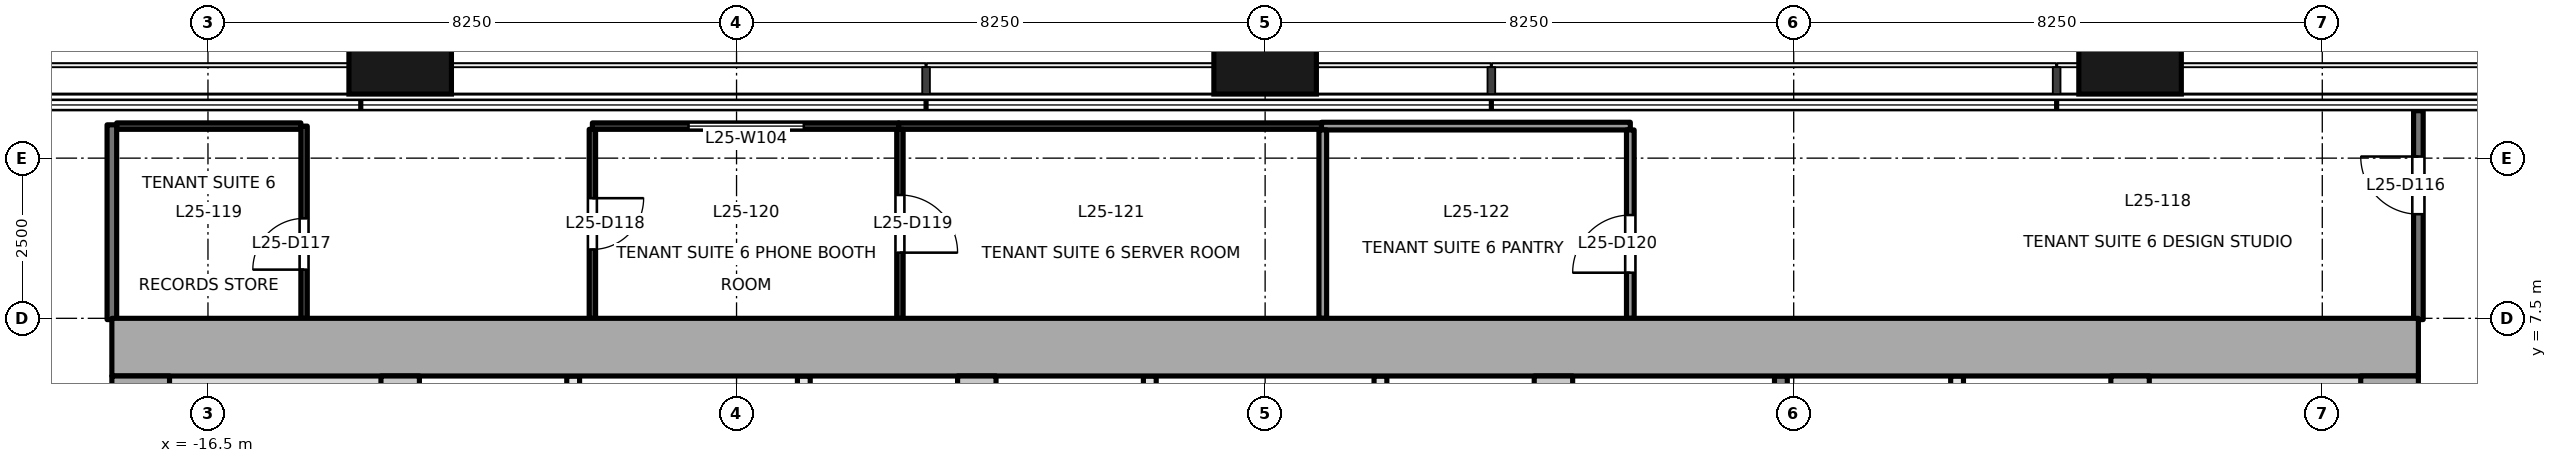
"""IFC4 building model, lengths in metres.
Left out: names, types, materials, properties, quantities, classifications, styles, units other than length and angle.
Written with IfcOpenShell. Run it as: python <this file> out.ifc"""

import sys

from ifc_helpers import new_model, si_unit, direction, frame, frame_2d, origin, origin_2d, place, context, subcontext, project, spatial, rectangle, extrude, element, fill, save


model = new_model("IFC4")
c1 = context("Model", 3, precision=1e-05, world=origin(), true_north=direction((0.0, 1.0)))
c2 = subcontext(c1, "Body", "Model", "MODEL_VIEW")
j1 = project(units=[si_unit("LENGTHUNIT", "METRE"), si_unit("PLANEANGLEUNIT", "RADIAN")], contexts=[c1])
p1 = place(None, origin())
s1 = spatial("IfcSite", under=j1, at=p1, CompositionType="ELEMENT")
p2 = place(p1, origin())
s2 = spatial("IfcBuilding", under=s1, at=p2, CompositionType="ELEMENT")
p3 = place(p2, frame((0.0, 0.0, 111.7)))
s3 = spatial("IfcBuildingStorey", under=s2, at=p3, CompositionType="ELEMENT", Elevation=111.7)
for number, where, z_axis, x_axis in (
    (1, (-13.5, 11.9, -0.2), (0.0, 0.0, 1.0), (1.0, 0.0, 0.0)),
    (2, (0.0, 11.9, -0.2), (0.0, 0.0, 1.0), (1.0, 0.0, 0.0)),
    (3, (13.5, 11.9, -0.2), (0.0, 0.0, 1.0), (1.0, 0.0, 0.0)),
):
    element("IfcColumn", number, at=place(p3, frame(where, z_axis=z_axis, x_axis=x_axis)), inside=s3, PredefinedType="COLUMN", context=c2, shape_type="SweptSolid", body=[
        extrude(rectangle(XDim=1.6, YDim=1.8, at=origin_2d()), origin(), (0.0, 0.0, 1.0), 4.0),
    ])
p4 = place(p3, frame((-18.0, 7.05, -0.2), z_axis=(0.0, 0.0, 1.0), x_axis=(1.0, 0.0, 0.0)))
e4 = element("IfcWall", 4, at=p4, inside=s3, PredefinedType="SHEAR", context=c2, shape_type="SweptSolid", body=[
    extrude(rectangle(XDim=36.0, YDim=0.9, at=frame_2d((18.0, 0.0))), origin(), (0.0, 0.0, 1.0), 4.0),
])
p5 = place(p3, frame((-17.55, -6.6, -0.2), z_axis=(0.0, 0.0, 1.0), x_axis=(0.0, 1.0, 0.0)))
e5 = element("IfcWall", 5, at=p5, inside=s3, PredefinedType="SHEAR", context=c2, shape_type="SweptSolid", body=[
    extrude(rectangle(XDim=13.2, YDim=0.9, at=frame_2d((6.6, 0.0))), origin(), (0.0, 0.0, 1.0), 4.0),
])
p6 = place(p5, frame((4.55, 0.0, 0.2)))
e6 = element("IfcOpeningElement", 6, at=p6, cuts=e5, PredefinedType="OPENING", context=c2, shape_type="SweptSolid", body=[
    extrude(rectangle(XDim=1.2, YDim=2.1, at=frame_2d((0.6, 1.05))), frame((0.0, 0.46, 0.0), z_axis=(0.0, -1.0, 0.0), x_axis=(1.0, 0.0, 0.0)), (0.0, 0.0, 1.0), 0.921),
])
p7 = place(p3, frame((17.55, -6.6, -0.2), z_axis=(0.0, 0.0, 1.0), x_axis=(0.0, 1.0, 0.0)))
e7 = element("IfcWall", 7, at=p7, inside=s3, PredefinedType="SHEAR", context=c2, shape_type="SweptSolid", body=[
    extrude(rectangle(XDim=13.2, YDim=0.9, at=frame_2d((6.6, 0.0))), origin(), (0.0, 0.0, 1.0), 4.0),
])
p8 = place(p7, frame((4.55, 0.0, 0.2)))
e8 = element("IfcOpeningElement", 8, at=p8, cuts=e7, PredefinedType="OPENING", context=c2, shape_type="SweptSolid", body=[
    extrude(rectangle(XDim=1.2, YDim=2.1, at=frame_2d((0.6, 1.05))), frame((0.0, 0.46, 0.0), z_axis=(0.0, -1.0, 0.0), x_axis=(1.0, 0.0, 0.0)), (0.0, 0.0, 1.0), 0.921),
])
for number, where, z_axis, x_axis in (
    (9, (-13.5, -6.6, -0.2), (0.0, 0.0, 1.0), (0.0, 1.0, 0.0)),
    (10, (-4.5, -6.6, -0.2), (0.0, 0.0, 1.0), (0.0, 1.0, 0.0)),
    (11, (4.5, -6.6, -0.2), (0.0, 0.0, 1.0), (0.0, 1.0, 0.0)),
    (12, (13.5, -6.6, -0.2), (0.0, 0.0, 1.0), (0.0, 1.0, 0.0)),
):
    element("IfcWall", number, at=place(p3, frame(where, z_axis=z_axis, x_axis=x_axis)), inside=s3, PredefinedType="SHEAR", context=c2, shape_type="SweptSolid", body=[
        extrude(rectangle(XDim=13.2, YDim=0.6, at=frame_2d((6.6, 0.0))), origin(), (0.0, 0.0, 1.0), 4.0),
    ])
p9 = place(p3, frame((-10.8, -6.6, 0.0), z_axis=(0.0, 0.0, 1.0), x_axis=(0.0, 1.0, 0.0)))
e13 = element("IfcWall", 13, at=p9, inside=s3, PredefinedType="PARTITIONING", context=c2, shape_type="SweptSolid", body=[
    extrude(rectangle(XDim=13.2, YDim=0.2, at=frame_2d((6.6, 0.0))), origin(), (0.0, 0.0, 1.0), 3.8),
])
p10 = place(p9, frame((0.55, 0.0, 0.0)))
e14 = element("IfcOpeningElement", 14, at=p10, cuts=e13, PredefinedType="OPENING", context=c2, shape_type="SweptSolid", body=[
    extrude(rectangle(XDim=0.9, YDim=2.1, at=frame_2d((0.45, 1.05))), frame((0.0, 0.111, 0.0), z_axis=(0.0, -1.0, 0.0), x_axis=(1.0, 0.0, 0.0)), (0.0, 0.0, 1.0), 0.221),
])
p11 = place(p9, frame((2.9, 0.0, 0.0)))
e15 = element("IfcOpeningElement", 15, at=p11, cuts=e13, PredefinedType="OPENING", context=c2, shape_type="SweptSolid", body=[
    extrude(rectangle(XDim=1.2, YDim=2.1, at=frame_2d((0.6, 1.05))), frame((0.0, 0.111, 0.0), z_axis=(0.0, -1.0, 0.0), x_axis=(1.0, 0.0, 0.0)), (0.0, 0.0, 1.0), 0.221),
])
p12 = place(p9, frame((5.7, 0.0, 0.0)))
e16 = element("IfcOpeningElement", 16, at=p12, cuts=e13, PredefinedType="OPENING", context=c2, shape_type="SweptSolid", body=[
    extrude(rectangle(XDim=1.2, YDim=2.1, at=frame_2d((0.6, 1.05))), frame((0.0, 0.111, 0.0), z_axis=(0.0, -1.0, 0.0), x_axis=(1.0, 0.0, 0.0)), (0.0, 0.0, 1.0), 0.221),
])
p13 = place(p9, frame((8.5, 0.0, 0.0)))
e17 = element("IfcOpeningElement", 17, at=p13, cuts=e13, PredefinedType="OPENING", context=c2, shape_type="SweptSolid", body=[
    extrude(rectangle(XDim=1.2, YDim=2.1, at=frame_2d((0.6, 1.05))), frame((0.0, 0.111, 0.0), z_axis=(0.0, -1.0, 0.0), x_axis=(1.0, 0.0, 0.0)), (0.0, 0.0, 1.0), 0.221),
])
p14 = place(p9, frame((11.3, 0.0, 0.0)))
e18 = element("IfcOpeningElement", 18, at=p14, cuts=e13, PredefinedType="OPENING", context=c2, shape_type="SweptSolid", body=[
    extrude(rectangle(XDim=1.2, YDim=2.1, at=frame_2d((0.6, 1.05))), frame((0.0, 0.111, 0.0), z_axis=(0.0, -1.0, 0.0), x_axis=(1.0, 0.0, 0.0)), (0.0, 0.0, 1.0), 0.221),
])
p15 = place(p3, frame((-7.2, -6.6, 0.0), z_axis=(0.0, 0.0, 1.0), x_axis=(0.0, 1.0, 0.0)))
e19 = element("IfcWall", 19, at=p15, inside=s3, PredefinedType="PARTITIONING", context=c2, shape_type="SweptSolid", body=[
    extrude(rectangle(XDim=13.2, YDim=0.2, at=frame_2d((6.6, 0.0))), origin(), (0.0, 0.0, 1.0), 3.8),
])
p16 = place(p15, frame((0.55, 0.0, 0.0)))
e20 = element("IfcOpeningElement", 20, at=p16, cuts=e19, PredefinedType="OPENING", context=c2, shape_type="SweptSolid", body=[
    extrude(rectangle(XDim=0.9, YDim=2.1, at=frame_2d((0.45, 1.05))), frame((0.0, 0.111, 0.0), z_axis=(0.0, -1.0, 0.0), x_axis=(1.0, 0.0, 0.0)), (0.0, 0.0, 1.0), 0.221),
])
p17 = place(p15, frame((2.9, 0.0, 0.0)))
e21 = element("IfcOpeningElement", 21, at=p17, cuts=e19, PredefinedType="OPENING", context=c2, shape_type="SweptSolid", body=[
    extrude(rectangle(XDim=1.2, YDim=2.1, at=frame_2d((0.6, 1.05))), frame((0.0, 0.111, 0.0), z_axis=(0.0, -1.0, 0.0), x_axis=(1.0, 0.0, 0.0)), (0.0, 0.0, 1.0), 0.221),
])
p18 = place(p15, frame((5.7, 0.0, 0.0)))
e22 = element("IfcOpeningElement", 22, at=p18, cuts=e19, PredefinedType="OPENING", context=c2, shape_type="SweptSolid", body=[
    extrude(rectangle(XDim=1.2, YDim=2.1, at=frame_2d((0.6, 1.05))), frame((0.0, 0.111, 0.0), z_axis=(0.0, -1.0, 0.0), x_axis=(1.0, 0.0, 0.0)), (0.0, 0.0, 1.0), 0.221),
])
p19 = place(p15, frame((8.5, 0.0, 0.0)))
e23 = element("IfcOpeningElement", 23, at=p19, cuts=e19, PredefinedType="OPENING", context=c2, shape_type="SweptSolid", body=[
    extrude(rectangle(XDim=1.2, YDim=2.1, at=frame_2d((0.6, 1.05))), frame((0.0, 0.111, 0.0), z_axis=(0.0, -1.0, 0.0), x_axis=(1.0, 0.0, 0.0)), (0.0, 0.0, 1.0), 0.221),
])
p20 = place(p15, frame((11.3, 0.0, 0.0)))
e24 = element("IfcOpeningElement", 24, at=p20, cuts=e19, PredefinedType="OPENING", context=c2, shape_type="SweptSolid", body=[
    extrude(rectangle(XDim=1.2, YDim=2.1, at=frame_2d((0.6, 1.05))), frame((0.0, 0.111, 0.0), z_axis=(0.0, -1.0, 0.0), x_axis=(1.0, 0.0, 0.0)), (0.0, 0.0, 1.0), 0.221),
])
p21 = place(p3, frame((-1.8, -6.6, 0.0), z_axis=(0.0, 0.0, 1.0), x_axis=(0.0, 1.0, 0.0)))
e25 = element("IfcWall", 25, at=p21, inside=s3, PredefinedType="PARTITIONING", context=c2, shape_type="SweptSolid", body=[
    extrude(rectangle(XDim=13.2, YDim=0.2, at=frame_2d((6.6, 0.0))), origin(), (0.0, 0.0, 1.0), 3.8),
])
p22 = place(p21, frame((0.55, 0.0, 0.0)))
e26 = element("IfcOpeningElement", 26, at=p22, cuts=e25, PredefinedType="OPENING", context=c2, shape_type="SweptSolid", body=[
    extrude(rectangle(XDim=0.9, YDim=2.1, at=frame_2d((0.45, 1.05))), frame((0.0, 0.111, 0.0), z_axis=(0.0, -1.0, 0.0), x_axis=(1.0, 0.0, 0.0)), (0.0, 0.0, 1.0), 0.221),
])
p23 = place(p3, frame((1.8, -6.6, 0.0), z_axis=(0.0, 0.0, 1.0), x_axis=(0.0, 1.0, 0.0)))
e27 = element("IfcWall", 27, at=p23, inside=s3, PredefinedType="PARTITIONING", context=c2, shape_type="SweptSolid", body=[
    extrude(rectangle(XDim=13.2, YDim=0.2, at=frame_2d((6.6, 0.0))), origin(), (0.0, 0.0, 1.0), 3.8),
])
p24 = place(p23, frame((0.55, 0.0, 0.0)))
e28 = element("IfcOpeningElement", 28, at=p24, cuts=e27, PredefinedType="OPENING", context=c2, shape_type="SweptSolid", body=[
    extrude(rectangle(XDim=0.9, YDim=2.1, at=frame_2d((0.45, 1.05))), frame((0.0, 0.111, 0.0), z_axis=(0.0, -1.0, 0.0), x_axis=(1.0, 0.0, 0.0)), (0.0, 0.0, 1.0), 0.221),
])
p25 = place(p3, frame((8.05, -6.6, 0.0), z_axis=(0.0, 0.0, 1.0), x_axis=(0.0, 1.0, 0.0)))
e29 = element("IfcWall", 29, at=p25, inside=s3, PredefinedType="PARTITIONING", context=c2, shape_type="SweptSolid", body=[
    extrude(rectangle(XDim=13.2, YDim=0.2, at=frame_2d((6.6, 0.0))), origin(), (0.0, 0.0, 1.0), 3.8),
])
p26 = place(p25, frame((0.91, 0.0, 0.0)))
e30 = element("IfcOpeningElement", 30, at=p26, cuts=e29, PredefinedType="OPENING", context=c2, shape_type="SweptSolid", body=[
    extrude(rectangle(XDim=0.9, YDim=2.1, at=frame_2d((0.45, 1.05))), frame((0.0, 0.111, 0.0), z_axis=(0.0, -1.0, 0.0), x_axis=(1.0, 0.0, 0.0)), (0.0, 0.0, 1.0), 0.221),
])
p27 = place(p25, frame((3.46, 0.0, 0.0)))
e31 = element("IfcOpeningElement", 31, at=p27, cuts=e29, PredefinedType="OPENING", context=c2, shape_type="SweptSolid", body=[
    extrude(rectangle(XDim=0.9, YDim=2.1, at=frame_2d((0.45, 1.05))), frame((0.0, 0.111, 0.0), z_axis=(0.0, -1.0, 0.0), x_axis=(1.0, 0.0, 0.0)), (0.0, 0.0, 1.0), 0.221),
])
p28 = place(p25, frame((5.5, 0.0, 0.0)))
e32 = element("IfcOpeningElement", 32, at=p28, cuts=e29, PredefinedType="OPENING", context=c2, shape_type="SweptSolid", body=[
    extrude(rectangle(XDim=0.9, YDim=2.1, at=frame_2d((0.45, 1.05))), frame((0.0, 0.111, 0.0), z_axis=(0.0, -1.0, 0.0), x_axis=(1.0, 0.0, 0.0)), (0.0, 0.0, 1.0), 0.221),
])
p29 = place(p25, frame((11.9, 0.0, 0.0)))
e33 = element("IfcOpeningElement", 33, at=p29, cuts=e29, PredefinedType="OPENING", context=c2, shape_type="SweptSolid", body=[
    extrude(rectangle(XDim=1.1, YDim=2.1, at=frame_2d((0.55, 1.05))), frame((0.0, 0.111, 0.0), z_axis=(0.0, -1.0, 0.0), x_axis=(1.0, 0.0, 0.0)), (0.0, 0.0, 1.0), 0.221),
])
p30 = place(p3, frame((10.8, -6.6, 0.0), z_axis=(0.0, 0.0, 1.0), x_axis=(0.0, 1.0, 0.0)))
e34 = element("IfcWall", 34, at=p30, inside=s3, PredefinedType="PARTITIONING", context=c2, shape_type="SweptSolid", body=[
    extrude(rectangle(XDim=13.2, YDim=0.2, at=frame_2d((6.6, 0.0))), origin(), (0.0, 0.0, 1.0), 3.8),
])
p31 = place(p30, frame((0.7, 0.0, 0.0)))
e35 = element("IfcOpeningElement", 35, at=p31, cuts=e34, PredefinedType="OPENING", context=c2, shape_type="SweptSolid", body=[
    extrude(rectangle(XDim=1.2, YDim=2.1, at=frame_2d((0.6, 1.05))), frame((0.0, 0.111, 0.0), z_axis=(0.0, -1.0, 0.0), x_axis=(1.0, 0.0, 0.0)), (0.0, 0.0, 1.0), 0.221),
])
p32 = place(p30, frame((9.15, 0.0, 0.0)))
e36 = element("IfcOpeningElement", 36, at=p32, cuts=e34, PredefinedType="OPENING", context=c2, shape_type="SweptSolid", body=[
    extrude(rectangle(XDim=0.9, YDim=2.1, at=frame_2d((0.45, 1.05))), frame((0.0, 0.111, 0.0), z_axis=(0.0, -1.0, 0.0), x_axis=(1.0, 0.0, 0.0)), (0.0, 0.0, 1.0), 0.221),
])
p33 = place(p30, frame((11.55, 0.0, 0.0)))
e37 = element("IfcOpeningElement", 37, at=p33, cuts=e34, PredefinedType="OPENING", context=c2, shape_type="SweptSolid", body=[
    extrude(rectangle(XDim=0.9, YDim=2.1, at=frame_2d((0.45, 1.05))), frame((0.0, 0.111, 0.0), z_axis=(0.0, -1.0, 0.0), x_axis=(1.0, 0.0, 0.0)), (0.0, 0.0, 1.0), 0.221),
])
p34 = place(p3, frame((18.0, 7.48, 0.0), z_axis=(0.0, 0.0, 1.0), x_axis=(0.0, 1.0, 0.0)))
e38 = element("IfcWall", 38, at=p34, inside=s3, PredefinedType="PARTITIONING", context=c2, shape_type="SweptSolid", body=[
    extrude(rectangle(XDim=3.26, YDim=0.15, at=frame_2d((1.63, 0.0))), origin(), (0.0, 0.0, 1.0), 2.8),
])
p35 = place(p34, frame((1.645, 0.0, 0.0)))
e39 = element("IfcOpeningElement", 39, at=p35, cuts=e38, PredefinedType="OPENING", context=c2, shape_type="SweptSolid", body=[
    extrude(rectangle(XDim=0.9, YDim=2.1, at=frame_2d((0.45, 1.05))), frame((0.0, 0.085, 0.0), z_axis=(0.0, -1.0, 0.0), x_axis=(1.0, 0.0, 0.0)), (0.0, 0.0, 1.0), 0.171),
])
p36 = place(p3, frame((-18.0, 10.52, 0.0), z_axis=(0.0, 0.0, 1.0), x_axis=(0.0, -1.0, 0.0)))
e40 = element("IfcWall", 40, at=p36, inside=s3, PredefinedType="PARTITIONING", context=c2, shape_type="SweptSolid", body=[
    extrude(rectangle(XDim=3.04, YDim=0.15, at=frame_2d((1.52, 0.0))), origin(), (0.0, 0.0, 1.0), 3.8),
])
p37 = place(p3, frame((-15.05, 10.5, 0.0), z_axis=(0.0, 0.0, 1.0), x_axis=(-1.0, 0.0, 0.0)))
e41 = element("IfcWall", 41, at=p37, inside=s3, PredefinedType="PARTITIONING", context=c2, shape_type="SweptSolid", body=[
    extrude(rectangle(XDim=2.875, YDim=0.1, at=frame_2d((1.438, 0.0))), origin(), (0.0, 0.0, 1.0), 3.8),
])
p38 = place(p3, frame((-15.0, 7.5, 0.0), z_axis=(0.0, 0.0, 1.0), x_axis=(0.0, 1.0, 0.0)))
e42 = element("IfcWall", 42, at=p38, inside=s3, PredefinedType="PARTITIONING", context=c2, shape_type="SweptSolid", body=[
    extrude(rectangle(XDim=3.0, YDim=0.1, at=frame_2d((1.5, 0.0))), origin(), (0.0, 0.0, 1.0), 3.8),
])
p39 = place(p38, frame((0.76, 0.0, 0.0)))
e43 = element("IfcOpeningElement", 43, at=p39, cuts=e42, PredefinedType="OPENING", context=c2, shape_type="SweptSolid", body=[
    extrude(rectangle(XDim=0.8, YDim=2.1, at=frame_2d((0.4, 1.05))), frame((0.0, 0.061, 0.0), z_axis=(0.0, -1.0, 0.0), x_axis=(1.0, 0.0, 0.0)), (0.0, 0.0, 1.0), 0.121),
])
p40 = place(p3, frame((-10.5, 10.45, 0.0), z_axis=(0.0, 0.0, 1.0), x_axis=(0.0, -1.0, 0.0)))
e44 = element("IfcWall", 44, at=p40, inside=s3, PredefinedType="PARTITIONING", context=c2, shape_type="SweptSolid", body=[
    extrude(rectangle(XDim=2.95, YDim=0.1, at=frame_2d((1.475, 0.0))), origin(), (0.0, 0.0, 1.0), 3.8),
])
p41 = place(p40, frame((1.075, 0.0, 0.0)))
e45 = element("IfcOpeningElement", 45, at=p41, cuts=e44, PredefinedType="OPENING", context=c2, shape_type="SweptSolid", body=[
    extrude(rectangle(XDim=0.8, YDim=2.1, at=frame_2d((0.4, 1.05))), frame((0.0, 0.061, 0.0), z_axis=(0.0, -1.0, 0.0), x_axis=(1.0, 0.0, 0.0)), (0.0, 0.0, 1.0), 0.121),
])
p42 = place(p3, frame((-5.72, 10.5, 0.0), z_axis=(0.0, 0.0, 1.0), x_axis=(-1.0, 0.0, 0.0)))
e46 = element("IfcWall", 46, at=p42, inside=s3, PredefinedType="PARTITIONING", context=c2, shape_type="SweptSolid", body=[
    extrude(rectangle(XDim=4.78, YDim=0.1, at=frame_2d((2.39, 0.0))), origin(), (0.0, 0.0, 1.0), 3.5),
])
p43 = place(p42, frame((1.48, 0.0, 0.9)))
e47 = element("IfcOpeningElement", 47, at=p43, cuts=e46, PredefinedType="OPENING", context=c2, shape_type="SweptSolid", body=[
    extrude(rectangle(XDim=1.8, YDim=1.2, at=frame_2d((0.9, 0.6))), frame((0.0, 0.061, 0.0), z_axis=(0.0, -1.0, 0.0), x_axis=(1.0, 0.0, 0.0)), (0.0, 0.0, 1.0), 0.121),
])
p44 = place(p3, frame((0.88, 10.5, 0.0), z_axis=(0.0, 0.0, 1.0), x_axis=(-1.0, 0.0, 0.0)))
e48 = element("IfcWall", 48, at=p44, inside=s3, PredefinedType="PARTITIONING", context=c2, shape_type="SweptSolid", body=[
    extrude(rectangle(XDim=6.6, YDim=0.1, at=frame_2d((3.3, 0.0))), origin(), (0.0, 0.0, 1.0), 3.5),
])
p45 = place(p3, frame((5.7, 10.5, 0.0), z_axis=(0.0, 0.0, 1.0), x_axis=(-1.0, 0.0, 0.0)))
e49 = element("IfcWall", 49, at=p45, inside=s3, PredefinedType="PARTITIONING", context=c2, shape_type="SweptSolid", body=[
    extrude(rectangle(XDim=4.82, YDim=0.12, at=frame_2d((2.41, 0.0))), origin(), (0.0, 0.0, 1.0), 3.5),
])
p46 = place(p3, frame((5.7, 7.5, 0.0), z_axis=(0.0, 0.0, 1.0), x_axis=(0.0, 1.0, 0.0)))
e50 = element("IfcWall", 50, at=p46, inside=s3, PredefinedType="PARTITIONING", context=c2, shape_type="SweptSolid", body=[
    extrude(rectangle(XDim=2.94, YDim=0.12, at=frame_2d((1.47, 0.0))), origin(), (0.0, 0.0, 1.0), 3.8),
])
p47 = place(p46, frame((0.712, 0.0, 0.0)))
e51 = element("IfcOpeningElement", 51, at=p47, cuts=e50, PredefinedType="OPENING", context=c2, shape_type="SweptSolid", body=[
    extrude(rectangle(XDim=0.9, YDim=2.1, at=frame_2d((0.45, 1.05))), frame((0.0, 0.071, 0.0), z_axis=(0.0, -1.0, 0.0), x_axis=(1.0, 0.0, 0.0)), (0.0, 0.0, 1.0), 0.141),
])
p48 = place(p3, frame((-5.7, 10.45, 0.0), z_axis=(0.0, 0.0, 1.0), x_axis=(0.0, -1.0, 0.0)))
e52 = element("IfcWall", 52, at=p48, inside=s3, PredefinedType="PARTITIONING", context=c2, shape_type="SweptSolid", body=[
    extrude(rectangle(XDim=2.95, YDim=0.1, at=frame_2d((1.475, 0.0))), origin(), (0.0, 0.0, 1.0), 3.8),
])
p49 = place(p48, frame((1.025, 0.0, 0.0)))
e53 = element("IfcOpeningElement", 53, at=p49, cuts=e52, PredefinedType="OPENING", context=c2, shape_type="SweptSolid", body=[
    extrude(rectangle(XDim=0.9, YDim=2.1, at=frame_2d((0.45, 1.05))), frame((0.0, 0.061, 0.0), z_axis=(0.0, -1.0, 0.0), x_axis=(1.0, 0.0, 0.0)), (0.0, 0.0, 1.0), 0.121),
])
p50 = place(p3, frame((0.9, 10.44, 0.0), z_axis=(0.0, 0.0, 1.0), x_axis=(0.0, -1.0, 0.0)))
e54 = element("IfcWall", 54, at=p50, inside=s3, PredefinedType="PARTITIONING", context=c2, shape_type="SweptSolid", body=[
    extrude(rectangle(XDim=2.94, YDim=0.12, at=frame_2d((1.47, 0.0))), origin(), (0.0, 0.0, 1.0), 3.8),
])
p51 = place(p35, origin())
e55 = element("IfcDoor", 55, at=p51, inside=s3, OperationType="SINGLE_SWING_RIGHT", PredefinedType="DOOR", context=c2, shape_type="SweptSolid", body=[
    extrude(rectangle(XDim=0.9, YDim=2.1, at=frame_2d((0.45, 1.05))), frame((0.0, 0.025, 0.0), z_axis=(0.0, -1.0, 0.0), x_axis=(1.0, 0.0, 0.0)), (0.0, 0.0, 1.0), 0.05),
])
fill(e39, e55)
p52 = place(p39, origin())
e56 = element("IfcDoor", 56, at=p52, inside=s3, OperationType="SINGLE_SWING_LEFT", PredefinedType="DOOR", context=c2, shape_type="SweptSolid", body=[
    extrude(rectangle(XDim=0.8, YDim=2.1, at=frame_2d((0.4, 1.05))), frame((0.0, 0.025, 0.0), z_axis=(0.0, -1.0, 0.0), x_axis=(1.0, 0.0, 0.0)), (0.0, 0.0, 1.0), 0.05),
])
fill(e43, e56)
p53 = place(p41, origin())
e57 = element("IfcDoor", 57, at=p53, inside=s3, OperationType="SINGLE_SWING_LEFT", PredefinedType="DOOR", context=c2, shape_type="SweptSolid", body=[
    extrude(rectangle(XDim=0.8, YDim=2.1, at=frame_2d((0.4, 1.05))), frame((0.0, 0.025, 0.0), z_axis=(0.0, -1.0, 0.0), x_axis=(1.0, 0.0, 0.0)), (0.0, 0.0, 1.0), 0.05),
])
fill(e45, e57)
p54 = place(p49, origin())
e58 = element("IfcDoor", 58, at=p54, inside=s3, OperationType="SINGLE_SWING_RIGHT", PredefinedType="DOOR", context=c2, shape_type="SweptSolid", body=[
    extrude(rectangle(XDim=0.9, YDim=2.1, at=frame_2d((0.45, 1.05))), frame((0.0, 0.025, 0.0), z_axis=(0.0, -1.0, 0.0), x_axis=(1.0, 0.0, 0.0)), (0.0, 0.0, 1.0), 0.05),
])
fill(e53, e58)
p55 = place(p47, origin())
e59 = element("IfcDoor", 59, at=p55, inside=s3, OperationType="SINGLE_SWING_LEFT", PredefinedType="DOOR", context=c2, shape_type="SweptSolid", body=[
    extrude(rectangle(XDim=0.9, YDim=2.1, at=frame_2d((0.45, 1.05))), frame((0.0, 0.025, 0.0), z_axis=(0.0, -1.0, 0.0), x_axis=(1.0, 0.0, 0.0)), (0.0, 0.0, 1.0), 0.05),
])
fill(e51, e59)
p56 = place(p43, origin())
e60 = element("IfcWindow", 60, at=p56, inside=s3, PartitioningType="SINGLE_PANEL", PredefinedType="WINDOW", context=c2, shape_type="SweptSolid", body=[
    extrude(rectangle(XDim=1.8, YDim=1.2, at=frame_2d((0.9, 0.6))), frame((0.0, 0.03, 0.0), z_axis=(0.0, -1.0, 0.0), x_axis=(1.0, 0.0, 0.0)), (0.0, 0.0, 1.0), 0.06),
])
fill(e47, e60)
save(model, sys.argv[1])
